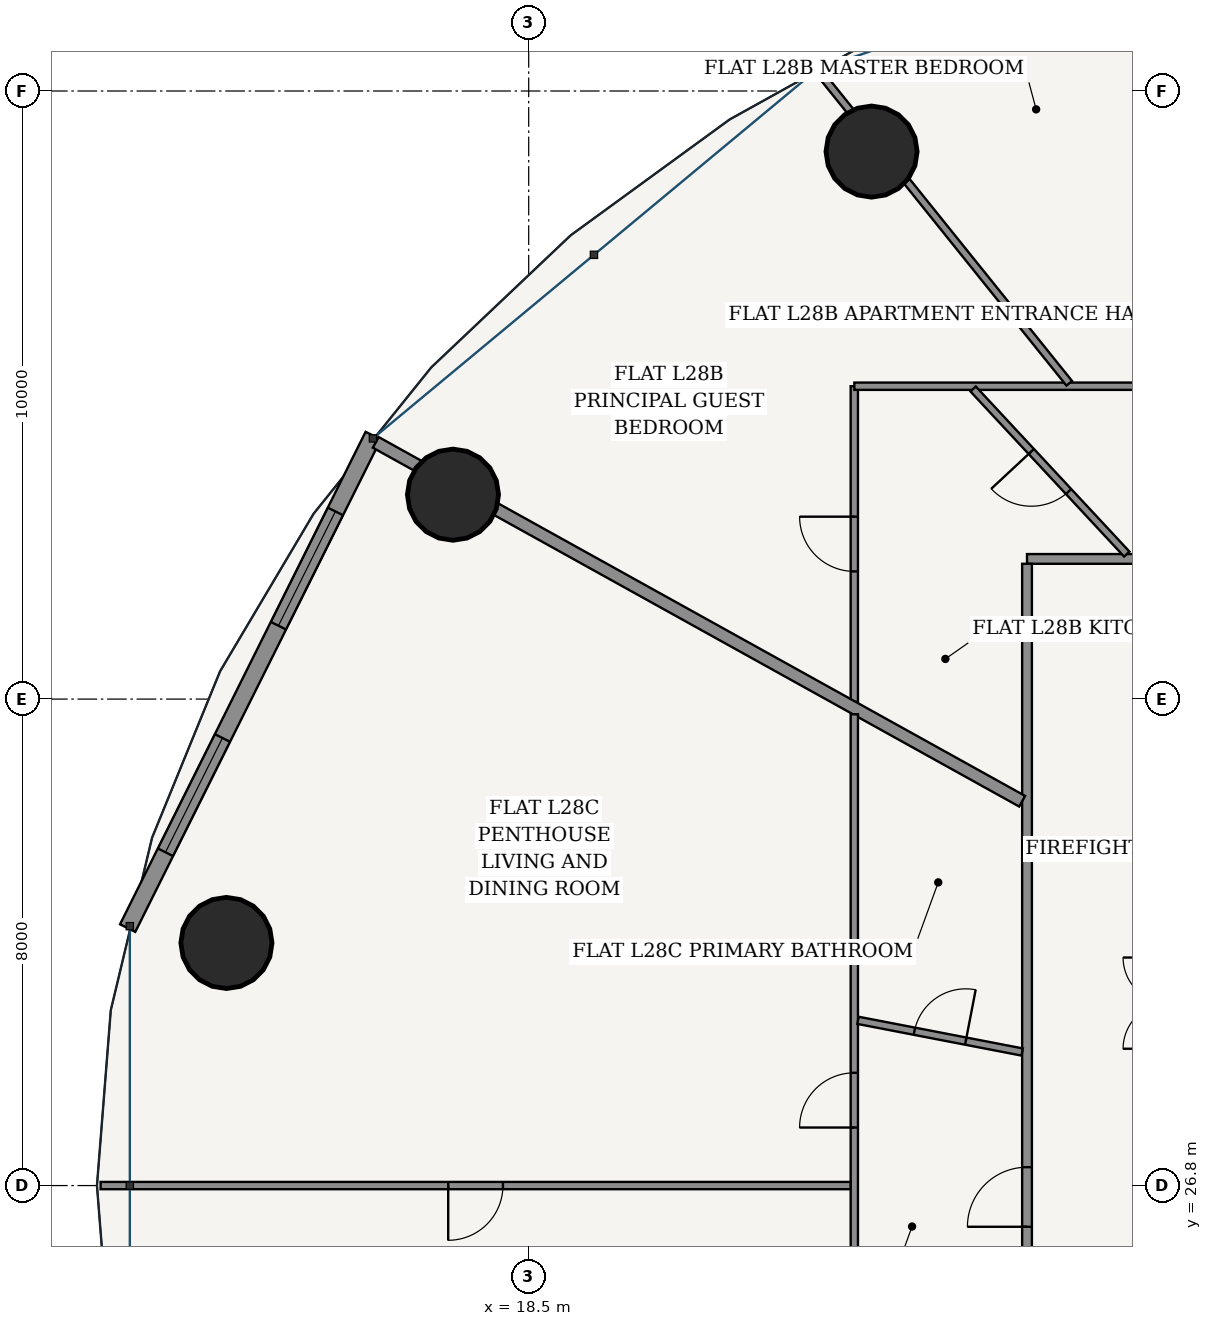
"""IFC4 building model, lengths in metres.
Left out: names, types, materials, properties, quantities, classifications, styles, units other than length and angle.
Written with IfcOpenShell. Run it as: python <this file> out.ifc"""

import sys

from ifc_helpers import new_model, si_unit, direction, frame, frame_2d, origin, origin_2d, place, context, subcontext, project, spatial, rectangle, hollow_circle, extrude, source, transform, mapped, element, fill, save


model = new_model("IFC4")
c1 = context("Model", 3, precision=1e-05, world=origin(), true_north=direction((-0.2419218956, 0.970295726276)))
c2 = subcontext(c1, "Body", "Model", "MODEL_VIEW")
j1 = project(units=[si_unit("LENGTHUNIT", "METRE"), si_unit("PLANEANGLEUNIT", "RADIAN")], contexts=[c1])
p1 = place(None, origin())
s1 = spatial("IfcSite", under=j1, at=p1, CompositionType="ELEMENT")
p2 = place(p1, origin())
s2 = spatial("IfcBuilding", under=s1, at=p2, CompositionType="ELEMENT")
p3 = place(p2, frame((0.0, 0.0, 108.6)))
s3 = spatial("IfcBuildingStorey", under=s2, at=p3, CompositionType="ELEMENT", Elevation=108.6)
for number, where, z_axis, x_axis in (
    (1, (24.138, 43.803, 0.0), (0.0, 0.0, 1.0), (1.0, 0.0, 0.0)),
    (2, (17.255, 38.161, 0.0), (0.0, 0.0, 1.0), (1.0, 0.0, 0.0)),
    (3, (13.529, 30.79, 0.0), (0.0, 0.0, 1.0), (1.0, 0.0, 0.0)),
):
    element("IfcColumn", number, at=place(p3, frame(where, z_axis=z_axis, x_axis=x_axis)), inside=s3, PredefinedType="COLUMN", context=c2, shape_type="SweptSolid", body=[
        extrude(hollow_circle(Radius=0.75, WallThickness=0.045, at=origin_2d()), origin(), (0.0, 0.0, 1.0), 3.6),
    ])
p4 = place(p3, frame((15.944, 39.133, 0.0), z_axis=(0.0, 0.0, 1.0), x_axis=(-0.446263788661, -0.894901464369, 0.0)))
e4 = element("IfcWall", 4, at=p4, inside=s3, PredefinedType="SOLIDWALL", context=c2, shape_type="SweptSolid", body=[
    extrude(rectangle(XDim=9.05, YDim=0.28, at=frame_2d((4.525, 0.0))), origin(), (0.0, 0.0, 1.0), 3.325),
])
p5 = place(p4, frame((1.394, 0.0, 0.85)))
e5 = element("IfcOpeningElement", 5, at=p5, cuts=e4, PredefinedType="OPENING", context=c2, shape_type="SweptSolid", body=[
    extrude(rectangle(XDim=2.1, YDim=1.95, at=frame_2d((1.05, 0.975))), frame((0.0, 0.15, 0.0), z_axis=(0.0, -1.0, 0.0), x_axis=(1.0, 0.0, 0.0)), (0.0, 0.0, 1.0), 0.3),
])
p6 = place(p4, frame((5.557, 0.0, 0.85)))
e6 = element("IfcOpeningElement", 6, at=p6, cuts=e4, PredefinedType="OPENING", context=c2, shape_type="SweptSolid", body=[
    extrude(rectangle(XDim=2.1, YDim=1.95, at=frame_2d((1.05, 0.975))), frame((0.0, 0.15, 0.0), z_axis=(0.0, -1.0, 0.0), x_axis=(1.0, 0.0, 0.0)), (0.0, 0.0, 1.0), 0.3),
])
p7 = place(p3, frame((26.695, 37.105, 0.0), z_axis=(0.0, 0.0, 1.0), x_axis=(1.0, 0.0, 0.0)))
e7 = element("IfcWall", 7, at=p7, inside=s3, PredefinedType="PARTITIONING", context=c2, shape_type="SweptSolid", body=[
    extrude(rectangle(XDim=22.61, YDim=0.16, at=frame_2d((11.305, 0.0))), origin(), (0.0, 0.0, 1.0), 2.767),
])
p8 = place(p7, frame((4.925, 0.0, 0.0)))
e8 = element("IfcOpeningElement", 8, at=p8, cuts=e7, PredefinedType="OPENING", context=c2, shape_type="SweptSolid", body=[
    extrude(rectangle(XDim=0.98, YDim=2.2, at=frame_2d((0.49, 1.1))), frame((0.0, 0.09, 0.0), z_axis=(0.0, -1.0, 0.0), x_axis=(1.0, 0.0, 0.0)), (0.0, 0.0, 1.0), 0.18),
])
p9 = place(p3, frame((26.695, 16.575, 0.0), z_axis=(0.0, 0.0, 1.0), x_axis=(0.0, 1.0, 0.0)))
e9 = element("IfcWall", 9, at=p9, inside=s3, PredefinedType="PARTITIONING", context=c2, shape_type="SweptSolid", body=[
    extrude(rectangle(XDim=20.45, YDim=0.16, at=frame_2d((10.225, 0.0))), origin(), (0.0, 0.0, 1.0), 2.767),
])
p10 = place(p9, frame((9.547, 0.0, 0.0)))
e10 = element("IfcOpeningElement", 10, at=p10, cuts=e9, PredefinedType="OPENING", context=c2, shape_type="SweptSolid", body=[
    extrude(rectangle(XDim=0.98, YDim=2.2, at=frame_2d((0.49, 1.1))), frame((0.0, 0.09, 0.0), z_axis=(0.0, -1.0, 0.0), x_axis=(1.0, 0.0, 0.0)), (0.0, 0.0, 1.0), 0.18),
])
p11 = place(p3, frame((23.855, 34.754, 0.0), z_axis=(0.0, 0.0, 1.0), x_axis=(0.0, 1.0, 0.0)))
e11 = element("IfcWall", 11, at=p11, inside=s3, PredefinedType="PARTITIONING", context=c2, shape_type="SweptSolid", body=[
    extrude(rectangle(XDim=5.191, YDim=0.12, at=frame_2d((2.595, 0.0))), origin(), (0.0, 0.0, 1.0), 3.004),
])
p12 = place(p11, frame((2.145, 0.0, 0.0)))
e12 = element("IfcOpeningElement", 12, at=p12, cuts=e11, PredefinedType="OPENING", context=c2, shape_type="SweptSolid", body=[
    extrude(rectangle(XDim=0.9, YDim=2.15, at=frame_2d((0.45, 1.075))), frame((0.0, 0.07, 0.0), z_axis=(0.0, -1.0, 0.0), x_axis=(1.0, 0.0, 0.0)), (0.0, 0.0, 1.0), 0.14),
])
p13 = place(p3, frame((23.855, 39.945, 0.0), z_axis=(0.0, 0.0, 1.0), x_axis=(1.0, 0.0, 0.0)))
e13 = element("IfcWall", 13, at=p13, inside=s3, PredefinedType="PARTITIONING", context=c2, shape_type="SweptSolid", body=[
    extrude(rectangle(XDim=17.19, YDim=0.12, at=frame_2d((8.595, 0.0))), origin(), (0.0, 0.0, 1.0), 2.767),
])
p14 = place(p13, frame((9.133, 0.0, 0.0)))
e14 = element("IfcOpeningElement", 14, at=p14, cuts=e13, PredefinedType="OPENING", context=c2, shape_type="SweptSolid", body=[
    extrude(rectangle(XDim=0.9, YDim=2.15, at=frame_2d((0.45, 1.075))), frame((0.0, 0.07, 0.0), z_axis=(0.0, -1.0, 0.0), x_axis=(1.0, 0.0, 0.0)), (0.0, 0.0, 1.0), 0.14),
])
p15 = place(p3, frame((31.419, 40.0, 0.0), z_axis=(0.0, 0.0, 1.0), x_axis=(-0.446188142997, 0.894939182877, 0.0)))
e15 = element("IfcWall", 15, at=p15, inside=s3, PredefinedType="PARTITIONING", context=c2, shape_type="SweptSolid", body=[
    extrude(rectangle(XDim=8.002, YDim=0.12, at=frame_2d((4.001, 0.0))), origin(), (0.0, 0.0, 1.0), 2.767),
])
p16 = place(p15, frame((3.551, 0.0, 0.0)))
e16 = element("IfcOpeningElement", 16, at=p16, cuts=e15, PredefinedType="OPENING", context=c2, shape_type="SweptSolid", body=[
    extrude(rectangle(XDim=0.9, YDim=2.15, at=frame_2d((0.45, 1.075))), frame((0.0, 0.07, 0.0), z_axis=(0.0, -1.0, 0.0), x_axis=(1.0, 0.0, 0.0)), (0.0, 0.0, 1.0), 0.14),
])
p17 = place(p3, frame((27.389, 39.993, 0.0), z_axis=(0.0, 0.0, 1.0), x_axis=(-0.626719700294, 0.779244773651, 0.0)))
e17 = element("IfcWall", 17, at=p17, inside=s3, PredefinedType="PARTITIONING", context=c2, shape_type="SweptSolid", body=[
    extrude(rectangle(XDim=6.537, YDim=0.12, at=frame_2d((3.269, 0.0))), origin(), (0.0, 0.0, 1.0), 2.767),
])
p18 = place(p3, frame((28.335, 37.185, 0.0), z_axis=(0.0, 0.0, 1.0), x_axis=(-0.681236086606, 0.732063791145, 0.0)))
e18 = element("IfcWall", 18, at=p18, inside=s3, PredefinedType="PARTITIONING", context=c2, shape_type="SweptSolid", body=[
    extrude(rectangle(XDim=3.708, YDim=0.12, at=frame_2d((1.854, 0.0))), origin(), (0.0, 0.0, 1.0), 2.767),
])
p19 = place(p18, frame((1.404, 0.0, 0.0)))
e19 = element("IfcOpeningElement", 19, at=p19, cuts=e18, PredefinedType="OPENING", context=c2, shape_type="SweptSolid", body=[
    extrude(rectangle(XDim=0.9, YDim=2.15, at=frame_2d((0.45, 1.075))), frame((0.0, 0.07, 0.0), z_axis=(0.0, -1.0, 0.0), x_axis=(1.0, 0.0, 0.0)), (0.0, 0.0, 1.0), 0.14),
])
p20 = place(p3, frame((26.615, 33.12, 0.0), z_axis=(0.0, 0.0, 1.0), x_axis=(-0.874319192772, 0.485351366692, 0.0)))
e20 = element("IfcWall", 20, at=p20, inside=s3, PredefinedType="PARTITIONING", context=c2, shape_type="SweptSolid", body=[
    extrude(rectangle(XDim=12.158, YDim=0.2, at=frame_2d((6.079, 0.0))), origin(), (0.0, 0.0, 1.0), 2.767),
])
p21 = place(p3, frame((23.855, 19.05, 0.0), z_axis=(0.0, 0.0, 1.0), x_axis=(0.0, 1.0, 0.0)))
e21 = element("IfcWall", 21, at=p21, inside=s3, PredefinedType="PARTITIONING", context=c2, shape_type="SweptSolid", body=[
    extrude(rectangle(XDim=15.501, YDim=0.12, at=frame_2d((7.75, 0.0))), origin(), (0.0, 0.0, 1.0), 2.767),
])
p22 = place(p21, frame((8.705, 0.0, 0.0)))
e22 = element("IfcOpeningElement", 22, at=p22, cuts=e21, PredefinedType="OPENING", context=c2, shape_type="SweptSolid", body=[
    extrude(rectangle(XDim=0.9, YDim=2.15, at=frame_2d((0.45, 1.075))), frame((0.0, 0.07, 0.0), z_axis=(0.0, -1.0, 0.0), x_axis=(1.0, 0.0, 0.0)), (0.0, 0.0, 1.0), 0.14),
])
p23 = place(p21, frame((1.111, 0.0, 0.0)))
e23 = element("IfcOpeningElement", 23, at=p23, cuts=e21, PredefinedType="OPENING", context=c2, shape_type="SweptSolid", body=[
    extrude(rectangle(XDim=0.9, YDim=2.15, at=frame_2d((0.45, 1.075))), frame((0.0, 0.07, 0.0), z_axis=(0.0, -1.0, 0.0), x_axis=(1.0, 0.0, 0.0)), (0.0, 0.0, 1.0), 0.14),
])
p24 = place(p3, frame((23.793, 26.8, 0.0), z_axis=(0.0, 0.0, 1.0), x_axis=(-1.0, 0.0, 0.0)))
e24 = element("IfcWall", 24, at=p24, inside=s3, PredefinedType="PARTITIONING", context=c2, shape_type="SweptSolid", body=[
    extrude(rectangle(XDim=12.333, YDim=0.12, at=frame_2d((6.167, 0.0))), origin(), (0.0, 0.0, 1.0), 2.767),
])
p25 = place(p24, frame((5.717, 0.0, 0.0)))
e25 = element("IfcOpeningElement", 25, at=p25, cuts=e24, PredefinedType="OPENING", context=c2, shape_type="SweptSolid", body=[
    extrude(rectangle(XDim=0.9, YDim=2.15, at=frame_2d((0.45, 1.075))), frame((0.0, 0.07, 0.0), z_axis=(0.0, -1.0, 0.0), x_axis=(1.0, 0.0, 0.0)), (0.0, 0.0, 1.0), 0.14),
])
p26 = place(p3, frame((26.615, 28.996, 0.0), z_axis=(0.0, 0.0, 1.0), x_axis=(-0.98189351628, 0.18943368942, 0.0)))
e26 = element("IfcWall", 26, at=p26, inside=s3, PredefinedType="PARTITIONING", context=c2, shape_type="SweptSolid", body=[
    extrude(rectangle(XDim=2.749, YDim=0.12, at=frame_2d((1.375, 0.0))), origin(), (0.0, 0.0, 1.0), 3.325),
])
p27 = place(p26, frame((0.944, 0.0, 0.0)))
e27 = element("IfcOpeningElement", 27, at=p27, cuts=e26, PredefinedType="OPENING", context=c2, shape_type="SweptSolid", body=[
    extrude(rectangle(XDim=0.86, YDim=2.15, at=frame_2d((0.43, 1.075))), frame((0.0, 0.07, 0.0), z_axis=(0.0, -1.0, 0.0), x_axis=(1.0, 0.0, 0.0)), (0.0, 0.0, 1.0), 0.14),
])
m1 = source(origin(), c2, "Body", "SweptSolid", [
    extrude(rectangle(XDim=2.1, YDim=1.95, at=frame_2d((1.05, 0.975))), frame((0.0, 0.03, 0.0), z_axis=(0.0, -1.0, 0.0), x_axis=(1.0, 0.0, 0.0)), (0.0, 0.0, 1.0), 0.06),
])
p28 = place(p5, origin())
e28 = element("IfcWindow", 28, at=p28, inside=s3, PartitioningType="SINGLE_PANEL", PredefinedType="WINDOW", context=c2, shape_type="MappedRepresentation", body=[
    mapped(m1, transform((0.0, 0.0, 0.0), scale=1.0)),
])
fill(e5, e28)
p29 = place(p6, origin())
e29 = element("IfcWindow", 29, at=p29, inside=s3, PartitioningType="SINGLE_PANEL", PredefinedType="WINDOW", context=c2, shape_type="MappedRepresentation", body=[
    mapped(m1, transform((0.0, 0.0, 0.0), scale=1.0)),
])
fill(e6, e29)
m2 = source(origin(), c2, "Body", "SweptSolid", [
    extrude(rectangle(XDim=0.9, YDim=2.15, at=frame_2d((0.45, 1.075))), frame((0.0, 0.025, 0.0), z_axis=(0.0, -1.0, 0.0), x_axis=(1.0, 0.0, 0.0)), (0.0, 0.0, 1.0), 0.05),
])
p30 = place(p19, origin())
e30 = element("IfcDoor", 30, at=p30, inside=s3, OperationType="SINGLE_SWING_RIGHT", PredefinedType="DOOR", context=c2, shape_type="MappedRepresentation", body=[
    mapped(m2, transform((0.0, 0.0, 0.0), scale=1.0)),
])
fill(e19, e30)
p31 = place(p12, origin())
e31 = element("IfcDoor", 31, at=p31, inside=s3, OperationType="SINGLE_SWING_RIGHT", PredefinedType="DOOR", context=c2, shape_type="MappedRepresentation", body=[
    mapped(m2, transform((0.0, 0.0, 0.0), scale=1.0)),
])
fill(e12, e31)
m3 = source(origin(), c2, "Body", "SweptSolid", [
    extrude(rectangle(XDim=0.98, YDim=2.2, at=frame_2d((0.49, 1.1))), frame((0.0, 0.025, 0.0), z_axis=(0.0, -1.0, 0.0), x_axis=(1.0, 0.0, 0.0)), (0.0, 0.0, 1.0), 0.05),
])
p32 = place(p10, origin())
e32 = element("IfcDoor", 32, at=p32, inside=s3, OperationType="SINGLE_SWING_LEFT", PredefinedType="DOOR", context=c2, shape_type="MappedRepresentation", body=[
    mapped(m3, transform((0.0, 0.0, 0.0), scale=1.0)),
])
fill(e10, e32)
m4 = source(origin(), c2, "Body", "SweptSolid", [
    extrude(rectangle(XDim=0.86, YDim=2.15, at=frame_2d((0.43, 1.075))), frame((0.0, 0.025, 0.0), z_axis=(0.0, -1.0, 0.0), x_axis=(1.0, 0.0, 0.0)), (0.0, 0.0, 1.0), 0.05),
])
p33 = place(p27, frame((0.86, 0.0, 0.0), z_axis=(0.0, 0.0, 1.0), x_axis=(-1.0, 0.0, 0.0)))
e33 = element("IfcDoor", 33, at=p33, inside=s3, OperationType="SINGLE_SWING_RIGHT", PredefinedType="DOOR", context=c2, shape_type="MappedRepresentation", body=[
    mapped(m4, transform((0.0, 0.0, 0.0), scale=1.0)),
])
fill(e27, e33)
p34 = place(p22, origin())
e34 = element("IfcDoor", 34, at=p34, inside=s3, OperationType="SINGLE_SWING_LEFT", PredefinedType="DOOR", context=c2, shape_type="MappedRepresentation", body=[
    mapped(m2, transform((0.0, 0.0, 0.0), scale=1.0)),
])
fill(e22, e34)
p35 = place(p25, origin())
e35 = element("IfcDoor", 35, at=p35, inside=s3, OperationType="SINGLE_SWING_RIGHT", PredefinedType="DOOR", context=c2, shape_type="MappedRepresentation", body=[
    mapped(m2, transform((0.0, 0.0, 0.0), scale=1.0)),
])
fill(e25, e35)
save(model, sys.argv[1])
